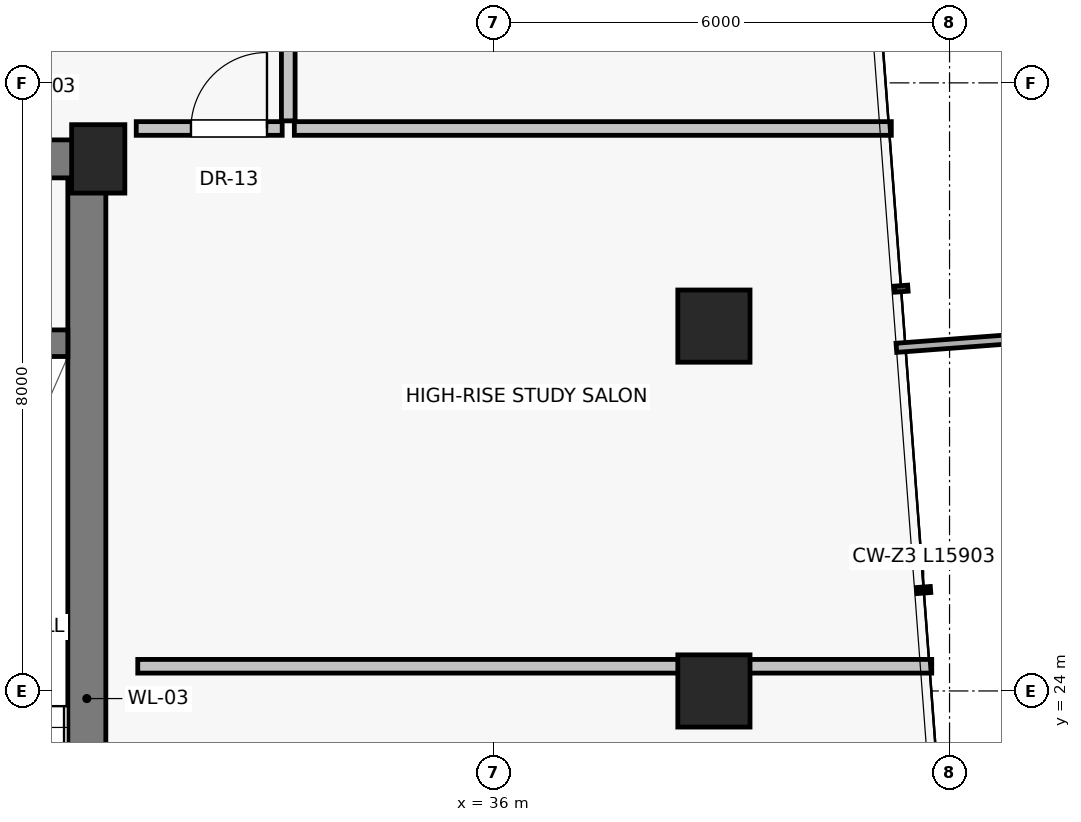
"""IFC4 building model, lengths in metres.
Left out: names, types, materials, properties, quantities, classifications, styles, units other than length and angle.
Written with IfcOpenShell. Run it as: python <this file> out.ifc"""

import sys

from ifc_helpers import new_model, si_unit, direction, frame, frame_2d, origin, origin_2d, place, context, subcontext, project, spatial, rectangle, extrude, source, transform, mapped, element, fill, save


model = new_model("IFC4")
c1 = context("Model", 3, precision=1e-05, world=origin(), true_north=direction((0.0, 1.0)))
c2 = subcontext(c1, "Body", "Model", "MODEL_VIEW")
j1 = project(units=[si_unit("LENGTHUNIT", "METRE"), si_unit("PLANEANGLEUNIT", "RADIAN")], contexts=[c1])
p1 = place(None, origin())
s1 = spatial("IfcSite", under=j1, at=p1, CompositionType="ELEMENT")
p2 = place(p1, origin())
s2 = spatial("IfcBuilding", under=s1, at=p2, CompositionType="ELEMENT")
p3 = place(p2, frame((0.0, 0.0, 191.85)))
s3 = spatial("IfcBuildingStorey", under=s2, at=p3, CompositionType="ELEMENT", Elevation=191.85)
p4 = place(p3, frame((30.8, 31.0, 0.0), z_axis=(0.0, 0.0, 1.0), x_axis=(1.0, 0.0, 0.0)))
e1 = element("IfcColumn", 1, at=p4, inside=s3, PredefinedType="PILASTER", context=c2, shape_type="SweptSolid", body=[
    extrude(rectangle(XDim=0.7, YDim=0.9, at=origin_2d()), origin(), (0.0, 0.0, 1.0), 3.25),
])
for number, where, z_axis, x_axis in (
    (2, (38.9, 24.0, 0.0), (0.0, 0.0, 1.0), (1.0, 0.0, 0.0)),
    (3, (38.9, 28.8, 0.0), (0.0, 0.0, 1.0), (1.0, 0.0, 0.0)),
):
    element("IfcColumn", number, at=place(p3, frame(where, z_axis=z_axis, x_axis=x_axis)), inside=s3, PredefinedType="COLUMN", context=c2, shape_type="SweptSolid", body=[
        extrude(rectangle(XDim=0.95, YDim=0.95, at=origin_2d()), origin(), (0.0, 0.0, 1.0), 3.25),
    ])
p5 = place(p3, frame((30.65, 16.8, 0.0), z_axis=(0.0, 0.0, 1.0), x_axis=(0.0, 1.0, 0.0)))
e4 = element("IfcWall", 4, at=p5, inside=s3, PredefinedType="SHEAR", context=c2, shape_type="SweptSolid", body=[
    extrude(rectangle(XDim=14.2, YDim=0.5, at=frame_2d((7.1, 0.0))), origin(), (0.0, 0.0, 1.0), 3.015),
])
p6 = place(p3, frame((27.0, 31.0, 0.0), z_axis=(0.0, 0.0, 1.0), x_axis=(1.0, 0.0, 0.0)))
e5 = element("IfcWall", 5, at=p6, inside=s3, PredefinedType="SHEAR", context=c2, shape_type="SweptSolid", body=[
    extrude(rectangle(XDim=3.8, YDim=0.5, at=frame_2d((1.9, 0.0))), origin(), (0.0, 0.0, 1.0), 3.015),
])
p7 = place(p6, frame((1.15, 0.0, 0.0)))
e6 = element("IfcOpeningElement", 6, at=p7, cuts=e5, PredefinedType="OPENING", context=c2, shape_type="SweptSolid", body=[
    extrude(rectangle(XDim=1.0, YDim=2.01, at=frame_2d((0.5, 1.005))), frame((0.0, 0.26, 0.0), z_axis=(0.0, -1.0, 0.0), x_axis=(1.0, 0.0, 0.0)), (0.0, 0.0, 1.0), 0.52),
])
p8 = place(p3, frame((27.025, 28.575, 0.0), z_axis=(0.0, 0.0, 1.0), x_axis=(1.0, 0.0, 0.0)))
e7 = element("IfcWall", 7, at=p8, inside=s3, PredefinedType="SHEAR", context=c2, shape_type="SweptSolid", body=[
    extrude(rectangle(XDim=3.375, YDim=0.35, at=frame_2d((1.688, 0.0))), origin(), (0.0, 0.0, 1.0), 3.015),
])
p9 = place(p3, frame((31.32, 24.325, 0.0), z_axis=(0.0, 0.0, 1.0), x_axis=(1.0, 0.0, 0.0)))
e8 = element("IfcWall", 8, at=p9, inside=s3, PredefinedType="PARTITIONING", context=c2, shape_type="SweptSolid", body=[
    extrude(rectangle(XDim=10.446, YDim=0.18, at=frame_2d((5.223, 0.0))), origin(), (0.0, 0.0, 1.0), 3.015),
])
p10 = place(p3, frame((33.3, 31.5, 0.0), z_axis=(0.0, 0.0, 1.0), x_axis=(0.0, 1.0, 0.0)))
e9 = element("IfcWall", 9, at=p10, inside=s3, PredefinedType="PARTITIONING", context=c2, shape_type="SweptSolid", body=[
    extrude(rectangle(XDim=1.9, YDim=0.18, at=frame_2d((0.95, 0.0))), origin(), (0.0, 0.0, 1.0), 3.015),
])
p11 = place(p3, frame((31.3, 31.4, 0.0), z_axis=(0.0, 0.0, 1.0), x_axis=(1.0, 0.0, 0.0)))
e10 = element("IfcWall", 10, at=p11, inside=s3, PredefinedType="PARTITIONING", context=c2, shape_type="SweptSolid", body=[
    extrude(rectangle(XDim=1.92, YDim=0.18, at=frame_2d((0.96, 0.0))), origin(), (0.0, 0.0, 1.0), 3.015),
])
p12 = place(p11, frame((0.72, 0.0, 0.0)))
e11 = element("IfcOpeningElement", 11, at=p12, cuts=e10, PredefinedType="OPENING", context=c2, shape_type="SweptSolid", body=[
    extrude(rectangle(XDim=1.0, YDim=2.01, at=frame_2d((0.5, 1.005))), frame((0.0, 0.1, 0.0), z_axis=(0.0, -1.0, 0.0), x_axis=(1.0, 0.0, 0.0)), (0.0, 0.0, 1.0), 0.2),
])
p13 = place(p3, frame((33.38, 31.4, 0.0), z_axis=(0.0, 0.0, 1.0), x_axis=(1.0, 0.0, 0.0)))
e12 = element("IfcWall", 12, at=p13, inside=s3, PredefinedType="PARTITIONING", context=c2, shape_type="SweptSolid", body=[
    extrude(rectangle(XDim=7.854, YDim=0.18, at=frame_2d((3.927, 0.0))), origin(), (0.0, 0.0, 1.0), 3.015),
])
m1 = source(origin(), c2, "Body", "SweptSolid", [
    extrude(rectangle(XDim=1.0, YDim=2.01, at=frame_2d((0.5, 1.005))), frame((0.0, 0.025, 0.0), z_axis=(0.0, -1.0, 0.0), x_axis=(1.0, 0.0, 0.0)), (0.0, 0.0, 1.0), 0.05),
])
p14 = place(p12, origin())
e13 = element("IfcDoor", 13, at=p14, inside=s3, OperationType="SINGLE_SWING_RIGHT", PredefinedType="DOOR", context=c2, shape_type="MappedRepresentation", body=[
    mapped(m1, transform((0.0, 0.0, 0.0), scale=1.0)),
])
fill(e11, e13)
save(model, sys.argv[1])
